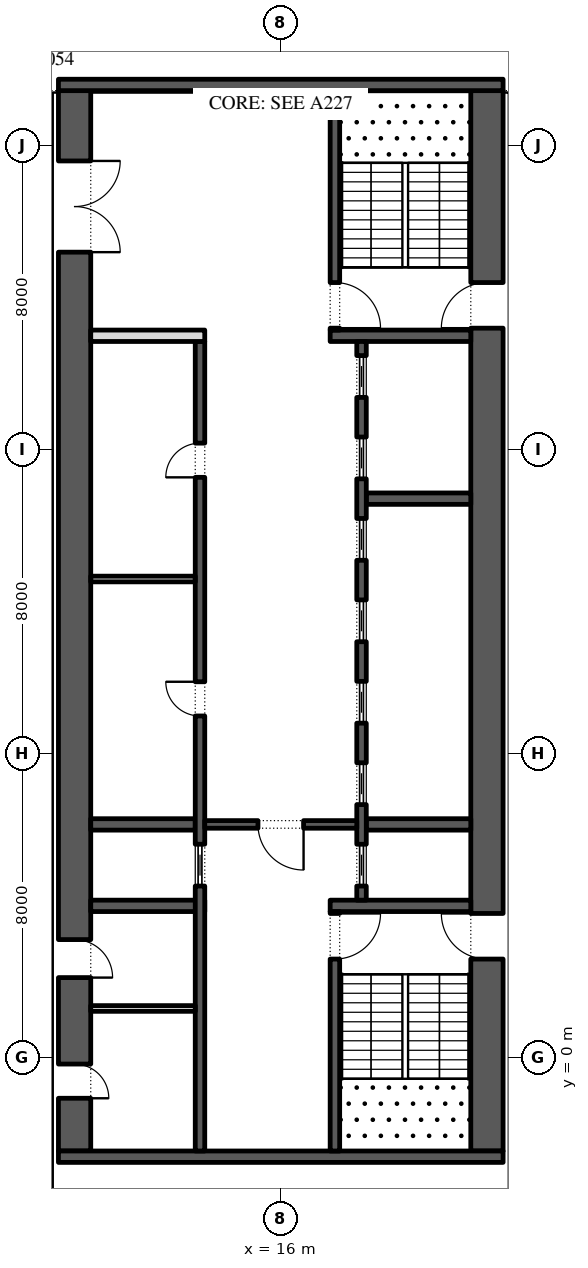
"""IFC4 building model, lengths in metres.
Left out: names, types, materials, properties, quantities, classifications, styles, units other than length and angle.
Written with IfcOpenShell. Run it as: python <this file> out.ifc"""

import sys

from ifc_helpers import new_model, si_unit, direction, frame, frame_2d, origin, place, context, subcontext, project, spatial, rectangle, extrude, element, fill, save


model = new_model("IFC4")
c1 = context("Model", 3, precision=1e-05, world=origin(), true_north=direction((0.0, 1.0)))
c2 = subcontext(c1, "Body", "Model", "MODEL_VIEW")
j1 = project(units=[si_unit("LENGTHUNIT", "METRE"), si_unit("PLANEANGLEUNIT", "RADIAN")], contexts=[c1])
p1 = place(None, origin())
s1 = spatial("IfcSite", under=j1, at=p1, CompositionType="ELEMENT")
p2 = place(p1, origin())
s2 = spatial("IfcBuilding", under=s1, at=p2, CompositionType="ELEMENT")
p3 = place(p2, frame((0.0, 0.0, 114.0)))
s3 = spatial("IfcBuildingStorey", under=s2, at=p3, CompositionType="ELEMENT", Elevation=114.0)
p4 = place(p3, frame((21.425, -2.45, 0.0), z_axis=(0.0, 0.0, 1.0), x_axis=(0.0, 1.0, 0.0)))
e1 = element("IfcWall", 1, at=p4, inside=s3, PredefinedType="SHEAR", context=c2, shape_type="SweptSolid", body=[
    extrude(rectangle(XDim=27.9, YDim=0.85, at=frame_2d((13.95, 0.0))), origin(), (0.0, 0.0, 1.0), 4.0),
])
p5 = place(p4, frame((5.05, 0.0, 0.0)))
e2 = element("IfcOpeningElement", 2, at=p5, cuts=e1, PredefinedType="OPENING", context=c2, shape_type="SweptSolid", body=[
    extrude(rectangle(XDim=1.2, YDim=2.1, at=frame_2d((0.6, 1.05))), frame((0.0, 0.435, 0.0), z_axis=(0.0, -1.0, 0.0), x_axis=(1.0, 0.0, 0.0)), (0.0, 0.0, 1.0), 0.87),
])
p6 = place(p4, frame((21.65, 0.0, 0.0)))
e3 = element("IfcOpeningElement", 3, at=p6, cuts=e1, PredefinedType="OPENING", context=c2, shape_type="SweptSolid", body=[
    extrude(rectangle(XDim=1.2, YDim=2.1, at=frame_2d((0.6, 1.05))), frame((0.0, 0.435, 0.0), z_axis=(0.0, -1.0, 0.0), x_axis=(1.0, 0.0, 0.0)), (0.0, 0.0, 1.0), 0.87),
])
p7 = place(p3, frame((10.575, -2.45, 0.0), z_axis=(0.0, 0.0, 1.0), x_axis=(0.0, 1.0, 0.0)))
e4 = element("IfcWall", 4, at=p7, inside=s3, PredefinedType="SHEAR", context=c2, shape_type="SweptSolid", body=[
    extrude(rectangle(XDim=27.9, YDim=0.85, at=frame_2d((13.95, 0.0))), origin(), (0.0, 0.0, 1.0), 4.0),
])
p8 = place(p7, frame((23.65, 0.0, 0.0)))
e5 = element("IfcOpeningElement", 5, at=p8, cuts=e4, PredefinedType="OPENING", context=c2, shape_type="SweptSolid", body=[
    extrude(rectangle(XDim=2.4, YDim=2.1, at=frame_2d((1.2, 1.05))), frame((0.0, 0.435, 0.0), z_axis=(0.0, -1.0, 0.0), x_axis=(1.0, 0.0, 0.0)), (0.0, 0.0, 1.0), 0.87),
])
p9 = place(p7, frame((1.387, 0.0, 0.0)))
e6 = element("IfcOpeningElement", 6, at=p9, cuts=e4, PredefinedType="OPENING", context=c2, shape_type="SweptSolid", body=[
    extrude(rectangle(XDim=0.9, YDim=2.1, at=frame_2d((0.45, 1.05))), frame((0.0, 0.435, 0.0), z_axis=(0.0, -1.0, 0.0), x_axis=(1.0, 0.0, 0.0)), (0.0, 0.0, 1.0), 0.87),
])
p10 = place(p7, frame((4.562, 0.0, 0.0)))
e7 = element("IfcOpeningElement", 7, at=p10, cuts=e4, PredefinedType="OPENING", context=c2, shape_type="SweptSolid", body=[
    extrude(rectangle(XDim=1.0, YDim=2.1, at=frame_2d((0.5, 1.05))), frame((0.0, 0.435, 0.0), z_axis=(0.0, -1.0, 0.0), x_axis=(1.0, 0.0, 0.0)), (0.0, 0.0, 1.0), 0.87),
])
for number, where, z_axis, x_axis in (
    (8, (10.15, -2.6, 0.0), (0.0, 0.0, 1.0), (1.0, 0.0, 0.0)),
    (9, (10.15, 25.6, 0.0), (0.0, 0.0, 1.0), (1.0, 0.0, 0.0)),
):
    element("IfcWall", number, at=place(p3, frame(where, z_axis=z_axis, x_axis=x_axis)), inside=s3, PredefinedType="SHEAR", context=c2, shape_type="SweptSolid", body=[
        extrude(rectangle(XDim=11.7, YDim=0.3, at=frame_2d((5.85, 0.0))), origin(), (0.0, 0.0, 1.0), 4.0),
    ])
p11 = place(p3, frame((17.3, 4.0, 0.0), z_axis=(0.0, 0.0, 1.0), x_axis=(1.0, 0.0, 0.0)))
e10 = element("IfcWall", 10, at=p11, inside=s3, PredefinedType="SHEAR", context=c2, shape_type="SweptSolid", body=[
    extrude(rectangle(XDim=3.7, YDim=0.3, at=frame_2d((1.85, 0.0))), origin(), (0.0, 0.0, 1.0), 4.0),
])
p12 = place(p3, frame((17.425, -2.45, 0.0), z_axis=(0.0, 0.0, 1.0), x_axis=(0.0, 1.0, 0.0)))
e11 = element("IfcWall", 11, at=p12, inside=s3, PredefinedType="SHEAR", context=c2, shape_type="SweptSolid", body=[
    extrude(rectangle(XDim=6.3, YDim=0.25, at=frame_2d((3.15, 0.0))), origin(), (0.0, 0.0, 1.0), 4.0),
])
p13 = place(p12, frame((5.05, 0.0, 0.0)))
e12 = element("IfcOpeningElement", 12, at=p13, cuts=e11, PredefinedType="OPENING", context=c2, shape_type="SweptSolid", body=[
    extrude(rectangle(XDim=1.2, YDim=2.1, at=frame_2d((0.6, 1.05))), frame((0.0, 0.135, 0.0), z_axis=(0.0, -1.0, 0.0), x_axis=(1.0, 0.0, 0.0)), (0.0, 0.0, 1.0), 0.27),
])
p14 = place(p3, frame((17.3, 19.0, 0.0), z_axis=(0.0, 0.0, 1.0), x_axis=(1.0, 0.0, 0.0)))
e13 = element("IfcWall", 13, at=p14, inside=s3, PredefinedType="SHEAR", context=c2, shape_type="SweptSolid", body=[
    extrude(rectangle(XDim=3.7, YDim=0.3, at=frame_2d((1.85, 0.0))), origin(), (0.0, 0.0, 1.0), 4.0),
])
p15 = place(p3, frame((17.425, 19.15, 0.0), z_axis=(0.0, 0.0, 1.0), x_axis=(0.0, 1.0, 0.0)))
e14 = element("IfcWall", 14, at=p15, inside=s3, PredefinedType="SHEAR", context=c2, shape_type="SweptSolid", body=[
    extrude(rectangle(XDim=6.3, YDim=0.25, at=frame_2d((3.15, 0.0))), origin(), (0.0, 0.0, 1.0), 4.0),
])
p16 = place(p15, frame((0.05, 0.0, 0.0)))
e15 = element("IfcOpeningElement", 15, at=p16, cuts=e14, PredefinedType="OPENING", context=c2, shape_type="SweptSolid", body=[
    extrude(rectangle(XDim=1.2, YDim=2.1, at=frame_2d((0.6, 1.05))), frame((0.0, 0.135, 0.0), z_axis=(0.0, -1.0, 0.0), x_axis=(1.0, 0.0, 0.0)), (0.0, 0.0, 1.0), 0.27),
])
for number, where, z_axis, x_axis in (
    (16, (18.25, 6.143, 0.0), (0.0, 0.0, 1.0), (1.0, 0.0, 0.0)),
    (17, (18.25, 14.714, 0.0), (0.0, 0.0, 1.0), (1.0, 0.0, 0.0)),
):
    element("IfcWall", number, at=place(p3, frame(where, z_axis=z_axis, x_axis=x_axis)), inside=s3, PredefinedType="SHEAR", context=c2, shape_type="SweptSolid", body=[
        extrude(rectangle(XDim=2.75, YDim=0.3, at=frame_2d((1.375, 0.0))), origin(), (0.0, 0.0, 1.0), 4.0),
    ])
p17 = place(p3, frame((18.125, 4.15, 0.0), z_axis=(0.0, 0.0, 1.0), x_axis=(0.0, 1.0, 0.0)))
e18 = element("IfcWall", 18, at=p17, inside=s3, PredefinedType="SHEAR", context=c2, shape_type="SweptSolid", body=[
    extrude(rectangle(XDim=14.7, YDim=0.25, at=frame_2d((7.35, 0.0))), origin(), (0.0, 0.0, 1.0), 4.0),
])
p18 = place(p17, frame((0.371, 0.0, 0.0)))
e19 = element("IfcOpeningElement", 19, at=p18, cuts=e18, PredefinedType="OPENING", context=c2, shape_type="SweptSolid", body=[
    extrude(rectangle(XDim=1.1, YDim=2.1, at=frame_2d((0.55, 1.05))), frame((0.0, 0.135, 0.0), z_axis=(0.0, -1.0, 0.0), x_axis=(1.0, 0.0, 0.0)), (0.0, 0.0, 1.0), 0.27),
])
p19 = place(p17, frame((2.514, 0.0, 0.0)))
e20 = element("IfcOpeningElement", 20, at=p19, cuts=e18, PredefinedType="OPENING", context=c2, shape_type="SweptSolid", body=[
    extrude(rectangle(XDim=1.1, YDim=2.1, at=frame_2d((0.55, 1.05))), frame((0.0, 0.135, 0.0), z_axis=(0.0, -1.0, 0.0), x_axis=(1.0, 0.0, 0.0)), (0.0, 0.0, 1.0), 0.27),
])
p20 = place(p17, frame((4.657, 0.0, 0.0)))
e21 = element("IfcOpeningElement", 21, at=p20, cuts=e18, PredefinedType="OPENING", context=c2, shape_type="SweptSolid", body=[
    extrude(rectangle(XDim=1.1, YDim=2.1, at=frame_2d((0.55, 1.05))), frame((0.0, 0.135, 0.0), z_axis=(0.0, -1.0, 0.0), x_axis=(1.0, 0.0, 0.0)), (0.0, 0.0, 1.0), 0.27),
])
p21 = place(p17, frame((6.8, 0.0, 0.0)))
e22 = element("IfcOpeningElement", 22, at=p21, cuts=e18, PredefinedType="OPENING", context=c2, shape_type="SweptSolid", body=[
    extrude(rectangle(XDim=1.1, YDim=2.1, at=frame_2d((0.55, 1.05))), frame((0.0, 0.135, 0.0), z_axis=(0.0, -1.0, 0.0), x_axis=(1.0, 0.0, 0.0)), (0.0, 0.0, 1.0), 0.27),
])
p22 = place(p17, frame((8.943, 0.0, 0.0)))
e23 = element("IfcOpeningElement", 23, at=p22, cuts=e18, PredefinedType="OPENING", context=c2, shape_type="SweptSolid", body=[
    extrude(rectangle(XDim=1.1, YDim=2.1, at=frame_2d((0.55, 1.05))), frame((0.0, 0.135, 0.0), z_axis=(0.0, -1.0, 0.0), x_axis=(1.0, 0.0, 0.0)), (0.0, 0.0, 1.0), 0.27),
])
p23 = place(p17, frame((11.086, 0.0, 0.0)))
e24 = element("IfcOpeningElement", 24, at=p23, cuts=e18, PredefinedType="OPENING", context=c2, shape_type="SweptSolid", body=[
    extrude(rectangle(XDim=1.1, YDim=2.1, at=frame_2d((0.55, 1.05))), frame((0.0, 0.135, 0.0), z_axis=(0.0, -1.0, 0.0), x_axis=(1.0, 0.0, 0.0)), (0.0, 0.0, 1.0), 0.27),
])
p24 = place(p17, frame((13.229, 0.0, 0.0)))
e25 = element("IfcOpeningElement", 25, at=p24, cuts=e18, PredefinedType="OPENING", context=c2, shape_type="SweptSolid", body=[
    extrude(rectangle(XDim=1.1, YDim=2.1, at=frame_2d((0.55, 1.05))), frame((0.0, 0.135, 0.0), z_axis=(0.0, -1.0, 0.0), x_axis=(1.0, 0.0, 0.0)), (0.0, 0.0, 1.0), 0.27),
])
p25 = place(p3, frame((11.0, 4.0, 0.0), z_axis=(0.0, 0.0, 1.0), x_axis=(1.0, 0.0, 0.0)))
e26 = element("IfcWall", 26, at=p25, inside=s3, PredefinedType="SHEAR", context=c2, shape_type="SweptSolid", body=[
    extrude(rectangle(XDim=3.0, YDim=0.3, at=frame_2d((1.5, 0.0))), origin(), (0.0, 0.0, 1.0), 4.0),
])
p26 = place(p3, frame((11.0, 6.143, 0.0), z_axis=(0.0, 0.0, 1.0), x_axis=(1.0, 0.0, 0.0)))
e27 = element("IfcWall", 27, at=p26, inside=s3, PredefinedType="SHEAR", context=c2, shape_type="SweptSolid", body=[
    extrude(rectangle(XDim=2.75, YDim=0.3, at=frame_2d((1.375, 0.0))), origin(), (0.0, 0.0, 1.0), 4.0),
])
p27 = place(p3, frame((13.875, -2.45, 0.0), z_axis=(0.0, 0.0, 1.0), x_axis=(0.0, 1.0, 0.0)))
e28 = element("IfcWall", 28, at=p27, inside=s3, PredefinedType="SHEAR", context=c2, shape_type="SweptSolid", body=[
    extrude(rectangle(XDim=21.3, YDim=0.25, at=frame_2d((10.65, 0.0))), origin(), (0.0, 0.0, 1.0), 4.0),
])
p28 = place(p27, frame((11.446, 0.0, 0.0)))
e29 = element("IfcOpeningElement", 29, at=p28, cuts=e28, PredefinedType="OPENING", context=c2, shape_type="SweptSolid", body=[
    extrude(rectangle(XDim=0.9, YDim=2.1, at=frame_2d((0.45, 1.05))), frame((0.0, 0.135, 0.0), z_axis=(0.0, -1.0, 0.0), x_axis=(1.0, 0.0, 0.0)), (0.0, 0.0, 1.0), 0.27),
])
p29 = place(p27, frame((17.725, 0.0, 0.0)))
e30 = element("IfcOpeningElement", 30, at=p29, cuts=e28, PredefinedType="OPENING", context=c2, shape_type="SweptSolid", body=[
    extrude(rectangle(XDim=0.9, YDim=2.1, at=frame_2d((0.45, 1.05))), frame((0.0, 0.135, 0.0), z_axis=(0.0, -1.0, 0.0), x_axis=(1.0, 0.0, 0.0)), (0.0, 0.0, 1.0), 0.27),
])
p30 = place(p27, frame((6.971, 0.0, 0.0)))
e31 = element("IfcOpeningElement", 31, at=p30, cuts=e28, PredefinedType="OPENING", context=c2, shape_type="SweptSolid", body=[
    extrude(rectangle(XDim=1.1, YDim=2.1, at=frame_2d((0.55, 1.05))), frame((0.0, 0.135, 0.0), z_axis=(0.0, -1.0, 0.0), x_axis=(1.0, 0.0, 0.0)), (0.0, 0.0, 1.0), 0.27),
])
p31 = place(p3, frame((11.0, 19.0, 0.0), z_axis=(0.0, 0.0, 1.0), x_axis=(1.0, 0.0, 0.0)))
e32 = element("IfcWall", 32, at=p31, inside=s3, PredefinedType="PARTITIONING", context=c2, shape_type="SweptSolid", body=[
    extrude(rectangle(XDim=3.0, YDim=0.3, at=frame_2d((1.5, 0.0))), origin(), (0.0, 0.0, 1.0), 4.0),
])
p32 = place(p3, frame((11.0, 12.6, 0.0), z_axis=(0.0, 0.0, 1.0), x_axis=(1.0, 0.0, 0.0)))
e33 = element("IfcWall", 33, at=p32, inside=s3, PredefinedType="PARTITIONING", context=c2, shape_type="SweptSolid", body=[
    extrude(rectangle(XDim=2.75, YDim=0.15, at=frame_2d((1.375, 0.0))), origin(), (0.0, 0.0, 1.0), 4.0),
])
p33 = place(p3, frame((14.0, 6.143, 0.0), z_axis=(0.0, 0.0, 1.0), x_axis=(1.0, 0.0, 0.0)))
e34 = element("IfcWall", 34, at=p33, inside=s3, PredefinedType="SHEAR", context=c2, shape_type="SweptSolid", body=[
    extrude(rectangle(XDim=4.0, YDim=0.2, at=frame_2d((2.0, 0.0))), origin(), (0.0, 0.0, 1.0), 4.0),
])
p34 = place(p33, frame((1.4, 0.0, 0.0)))
e35 = element("IfcOpeningElement", 35, at=p34, cuts=e34, PredefinedType="OPENING", context=c2, shape_type="SweptSolid", body=[
    extrude(rectangle(XDim=1.2, YDim=2.1, at=frame_2d((0.6, 1.05))), frame((0.0, 0.11, 0.0), z_axis=(0.0, -1.0, 0.0), x_axis=(1.0, 0.0, 0.0)), (0.0, 0.0, 1.0), 0.22),
])
p35 = place(p3, frame((11.0, 1.3, 0.0), z_axis=(0.0, 0.0, 1.0), x_axis=(1.0, 0.0, 0.0)))
e36 = element("IfcWall", 36, at=p35, inside=s3, PredefinedType="PARTITIONING", context=c2, shape_type="SweptSolid", body=[
    extrude(rectangle(XDim=2.75, YDim=0.15, at=frame_2d((1.375, 0.0))), origin(), (0.0, 0.0, 1.0), 4.0),
])
p36 = place(p18, origin())
e37 = element("IfcDoor", 37, at=p36, inside=s3, OperationType="SLIDING_TO_LEFT", PredefinedType="DOOR", context=c2, shape_type="SweptSolid", body=[
    extrude(rectangle(XDim=1.1, YDim=2.1, at=frame_2d((0.55, 1.05))), frame((0.0, 0.025, 0.0), z_axis=(0.0, -1.0, 0.0), x_axis=(1.0, 0.0, 0.0)), (0.0, 0.0, 1.0), 0.05),
])
fill(e19, e37)
p37 = place(p19, origin())
e38 = element("IfcDoor", 38, at=p37, inside=s3, OperationType="SLIDING_TO_LEFT", PredefinedType="DOOR", context=c2, shape_type="SweptSolid", body=[
    extrude(rectangle(XDim=1.1, YDim=2.1, at=frame_2d((0.55, 1.05))), frame((0.0, 0.025, 0.0), z_axis=(0.0, -1.0, 0.0), x_axis=(1.0, 0.0, 0.0)), (0.0, 0.0, 1.0), 0.05),
])
fill(e20, e38)
p38 = place(p20, origin())
e39 = element("IfcDoor", 39, at=p38, inside=s3, OperationType="SLIDING_TO_LEFT", PredefinedType="DOOR", context=c2, shape_type="SweptSolid", body=[
    extrude(rectangle(XDim=1.1, YDim=2.1, at=frame_2d((0.55, 1.05))), frame((0.0, 0.025, 0.0), z_axis=(0.0, -1.0, 0.0), x_axis=(1.0, 0.0, 0.0)), (0.0, 0.0, 1.0), 0.05),
])
fill(e21, e39)
p39 = place(p21, origin())
e40 = element("IfcDoor", 40, at=p39, inside=s3, OperationType="SLIDING_TO_LEFT", PredefinedType="DOOR", context=c2, shape_type="SweptSolid", body=[
    extrude(rectangle(XDim=1.1, YDim=2.1, at=frame_2d((0.55, 1.05))), frame((0.0, 0.025, 0.0), z_axis=(0.0, -1.0, 0.0), x_axis=(1.0, 0.0, 0.0)), (0.0, 0.0, 1.0), 0.05),
])
fill(e22, e40)
p40 = place(p22, origin())
e41 = element("IfcDoor", 41, at=p40, inside=s3, OperationType="SLIDING_TO_LEFT", PredefinedType="DOOR", context=c2, shape_type="SweptSolid", body=[
    extrude(rectangle(XDim=1.1, YDim=2.1, at=frame_2d((0.55, 1.05))), frame((0.0, 0.025, 0.0), z_axis=(0.0, -1.0, 0.0), x_axis=(1.0, 0.0, 0.0)), (0.0, 0.0, 1.0), 0.05),
])
fill(e23, e41)
p41 = place(p23, origin())
e42 = element("IfcDoor", 42, at=p41, inside=s3, OperationType="SLIDING_TO_LEFT", PredefinedType="DOOR", context=c2, shape_type="SweptSolid", body=[
    extrude(rectangle(XDim=1.1, YDim=2.1, at=frame_2d((0.55, 1.05))), frame((0.0, 0.025, 0.0), z_axis=(0.0, -1.0, 0.0), x_axis=(1.0, 0.0, 0.0)), (0.0, 0.0, 1.0), 0.05),
])
fill(e24, e42)
p42 = place(p24, origin())
e43 = element("IfcDoor", 43, at=p42, inside=s3, OperationType="SLIDING_TO_LEFT", PredefinedType="DOOR", context=c2, shape_type="SweptSolid", body=[
    extrude(rectangle(XDim=1.1, YDim=2.1, at=frame_2d((0.55, 1.05))), frame((0.0, 0.025, 0.0), z_axis=(0.0, -1.0, 0.0), x_axis=(1.0, 0.0, 0.0)), (0.0, 0.0, 1.0), 0.05),
])
fill(e25, e43)
p43 = place(p28, origin())
e44 = element("IfcDoor", 44, at=p43, inside=s3, OperationType="SINGLE_SWING_LEFT", PredefinedType="DOOR", context=c2, shape_type="SweptSolid", body=[
    extrude(rectangle(XDim=0.9, YDim=2.1, at=frame_2d((0.45, 1.05))), frame((0.0, 0.125, 0.0), z_axis=(0.0, -1.0, 0.0), x_axis=(1.0, 0.0, 0.0)), (0.0, 0.0, 1.0), 0.05),
])
fill(e29, e44)
p44 = place(p29, origin())
e45 = element("IfcDoor", 45, at=p44, inside=s3, OperationType="SINGLE_SWING_RIGHT", PredefinedType="DOOR", context=c2, shape_type="SweptSolid", body=[
    extrude(rectangle(XDim=0.9, YDim=2.1, at=frame_2d((0.45, 1.05))), frame((0.0, 0.125, 0.0), z_axis=(0.0, -1.0, 0.0), x_axis=(1.0, 0.0, 0.0)), (0.0, 0.0, 1.0), 0.05),
])
fill(e30, e45)
p45 = place(p30, origin())
e46 = element("IfcDoor", 46, at=p45, inside=s3, OperationType="SLIDING_TO_LEFT", PredefinedType="DOOR", context=c2, shape_type="SweptSolid", body=[
    extrude(rectangle(XDim=1.1, YDim=2.1, at=frame_2d((0.55, 1.05))), frame((0.0, 0.025, 0.0), z_axis=(0.0, -1.0, 0.0), x_axis=(1.0, 0.0, 0.0)), (0.0, 0.0, 1.0), 0.05),
])
fill(e31, e46)
p46 = place(p34, frame((1.2, 0.0, 0.0), z_axis=(0.0, 0.0, 1.0), x_axis=(-1.0, 0.0, 0.0)))
e47 = element("IfcDoor", 47, at=p46, inside=s3, OperationType="SINGLE_SWING_RIGHT", PredefinedType="DOOR", context=c2, shape_type="SweptSolid", body=[
    extrude(rectangle(XDim=1.2, YDim=2.1, at=frame_2d((0.6, 1.05))), frame((0.0, 0.025, 0.0), z_axis=(0.0, -1.0, 0.0), x_axis=(1.0, 0.0, 0.0)), (0.0, 0.0, 1.0), 0.05),
])
fill(e35, e47)
p47 = place(p8, frame((2.4, 0.0, 0.0), z_axis=(0.0, 0.0, 1.0), x_axis=(-1.0, 0.0, 0.0)))
e48 = element("IfcDoor", 48, at=p47, inside=s3, OperationType="DOUBLE_DOOR_SINGLE_SWING", PredefinedType="DOOR", context=c2, shape_type="SweptSolid", body=[
    extrude(rectangle(XDim=2.4, YDim=2.1, at=frame_2d((1.2, 1.05))), frame((0.0, 0.025, 0.0), z_axis=(0.0, -1.0, 0.0), x_axis=(1.0, 0.0, 0.0)), (0.0, 0.0, 1.0), 0.05),
])
fill(e5, e48)
p48 = place(p13, frame((1.2, 0.0, 0.0), z_axis=(0.0, 0.0, 1.0), x_axis=(-1.0, 0.0, 0.0)))
e49 = element("IfcDoor", 49, at=p48, inside=s3, OperationType="SINGLE_SWING_RIGHT", PredefinedType="DOOR", context=c2, shape_type="SweptSolid", body=[
    extrude(rectangle(XDim=1.2, YDim=2.1, at=frame_2d((0.6, 1.05))), frame((0.0, 0.025, 0.0), z_axis=(0.0, -1.0, 0.0), x_axis=(1.0, 0.0, 0.0)), (0.0, 0.0, 1.0), 0.05),
])
fill(e12, e49)
p49 = place(p5, origin())
e50 = element("IfcDoor", 50, at=p49, inside=s3, OperationType="SINGLE_SWING_LEFT", PredefinedType="DOOR", context=c2, shape_type="SweptSolid", body=[
    extrude(rectangle(XDim=1.2, YDim=2.1, at=frame_2d((0.6, 1.05))), frame((0.0, 0.025, 0.0), z_axis=(0.0, -1.0, 0.0), x_axis=(1.0, 0.0, 0.0)), (0.0, 0.0, 1.0), 0.05),
])
fill(e2, e50)
p50 = place(p16, frame((1.2, 0.0, 0.0), z_axis=(0.0, 0.0, 1.0), x_axis=(-1.0, 0.0, 0.0)))
e51 = element("IfcDoor", 51, at=p50, inside=s3, OperationType="SINGLE_SWING_LEFT", PredefinedType="DOOR", context=c2, shape_type="SweptSolid", body=[
    extrude(rectangle(XDim=1.2, YDim=2.1, at=frame_2d((0.6, 1.05))), frame((0.0, 0.025, 0.0), z_axis=(0.0, -1.0, 0.0), x_axis=(1.0, 0.0, 0.0)), (0.0, 0.0, 1.0), 0.05),
])
fill(e15, e51)
p51 = place(p6, origin())
e52 = element("IfcDoor", 52, at=p51, inside=s3, OperationType="SINGLE_SWING_RIGHT", PredefinedType="DOOR", context=c2, shape_type="SweptSolid", body=[
    extrude(rectangle(XDim=1.2, YDim=2.1, at=frame_2d((0.6, 1.05))), frame((0.0, 0.025, 0.0), z_axis=(0.0, -1.0, 0.0), x_axis=(1.0, 0.0, 0.0)), (0.0, 0.0, 1.0), 0.05),
])
fill(e3, e52)
p52 = place(p9, frame((0.9, -0.8, 0.0), z_axis=(0.0, 0.0, 1.0), x_axis=(-1.0, 0.0, 0.0)))
e53 = element("IfcDoor", 53, at=p52, inside=s3, OperationType="SINGLE_SWING_LEFT", PredefinedType="DOOR", context=c2, shape_type="SweptSolid", body=[
    extrude(rectangle(XDim=0.9, YDim=2.1, at=frame_2d((0.45, 1.05))), frame((0.0, -0.375, 0.0), z_axis=(0.0, -1.0, 0.0), x_axis=(1.0, 0.0, 0.0)), (0.0, 0.0, 1.0), 0.05),
])
fill(e6, e53)
p53 = place(p10, frame((1.0, -0.8, 0.0), z_axis=(0.0, 0.0, 1.0), x_axis=(-1.0, 0.0, 0.0)))
e54 = element("IfcDoor", 54, at=p53, inside=s3, OperationType="SINGLE_SWING_LEFT", PredefinedType="DOOR", context=c2, shape_type="SweptSolid", body=[
    extrude(rectangle(XDim=1.0, YDim=2.1, at=frame_2d((0.5, 1.05))), frame((0.0, -0.375, 0.0), z_axis=(0.0, -1.0, 0.0), x_axis=(1.0, 0.0, 0.0)), (0.0, 0.0, 1.0), 0.05),
])
fill(e7, e54)
save(model, sys.argv[1])
